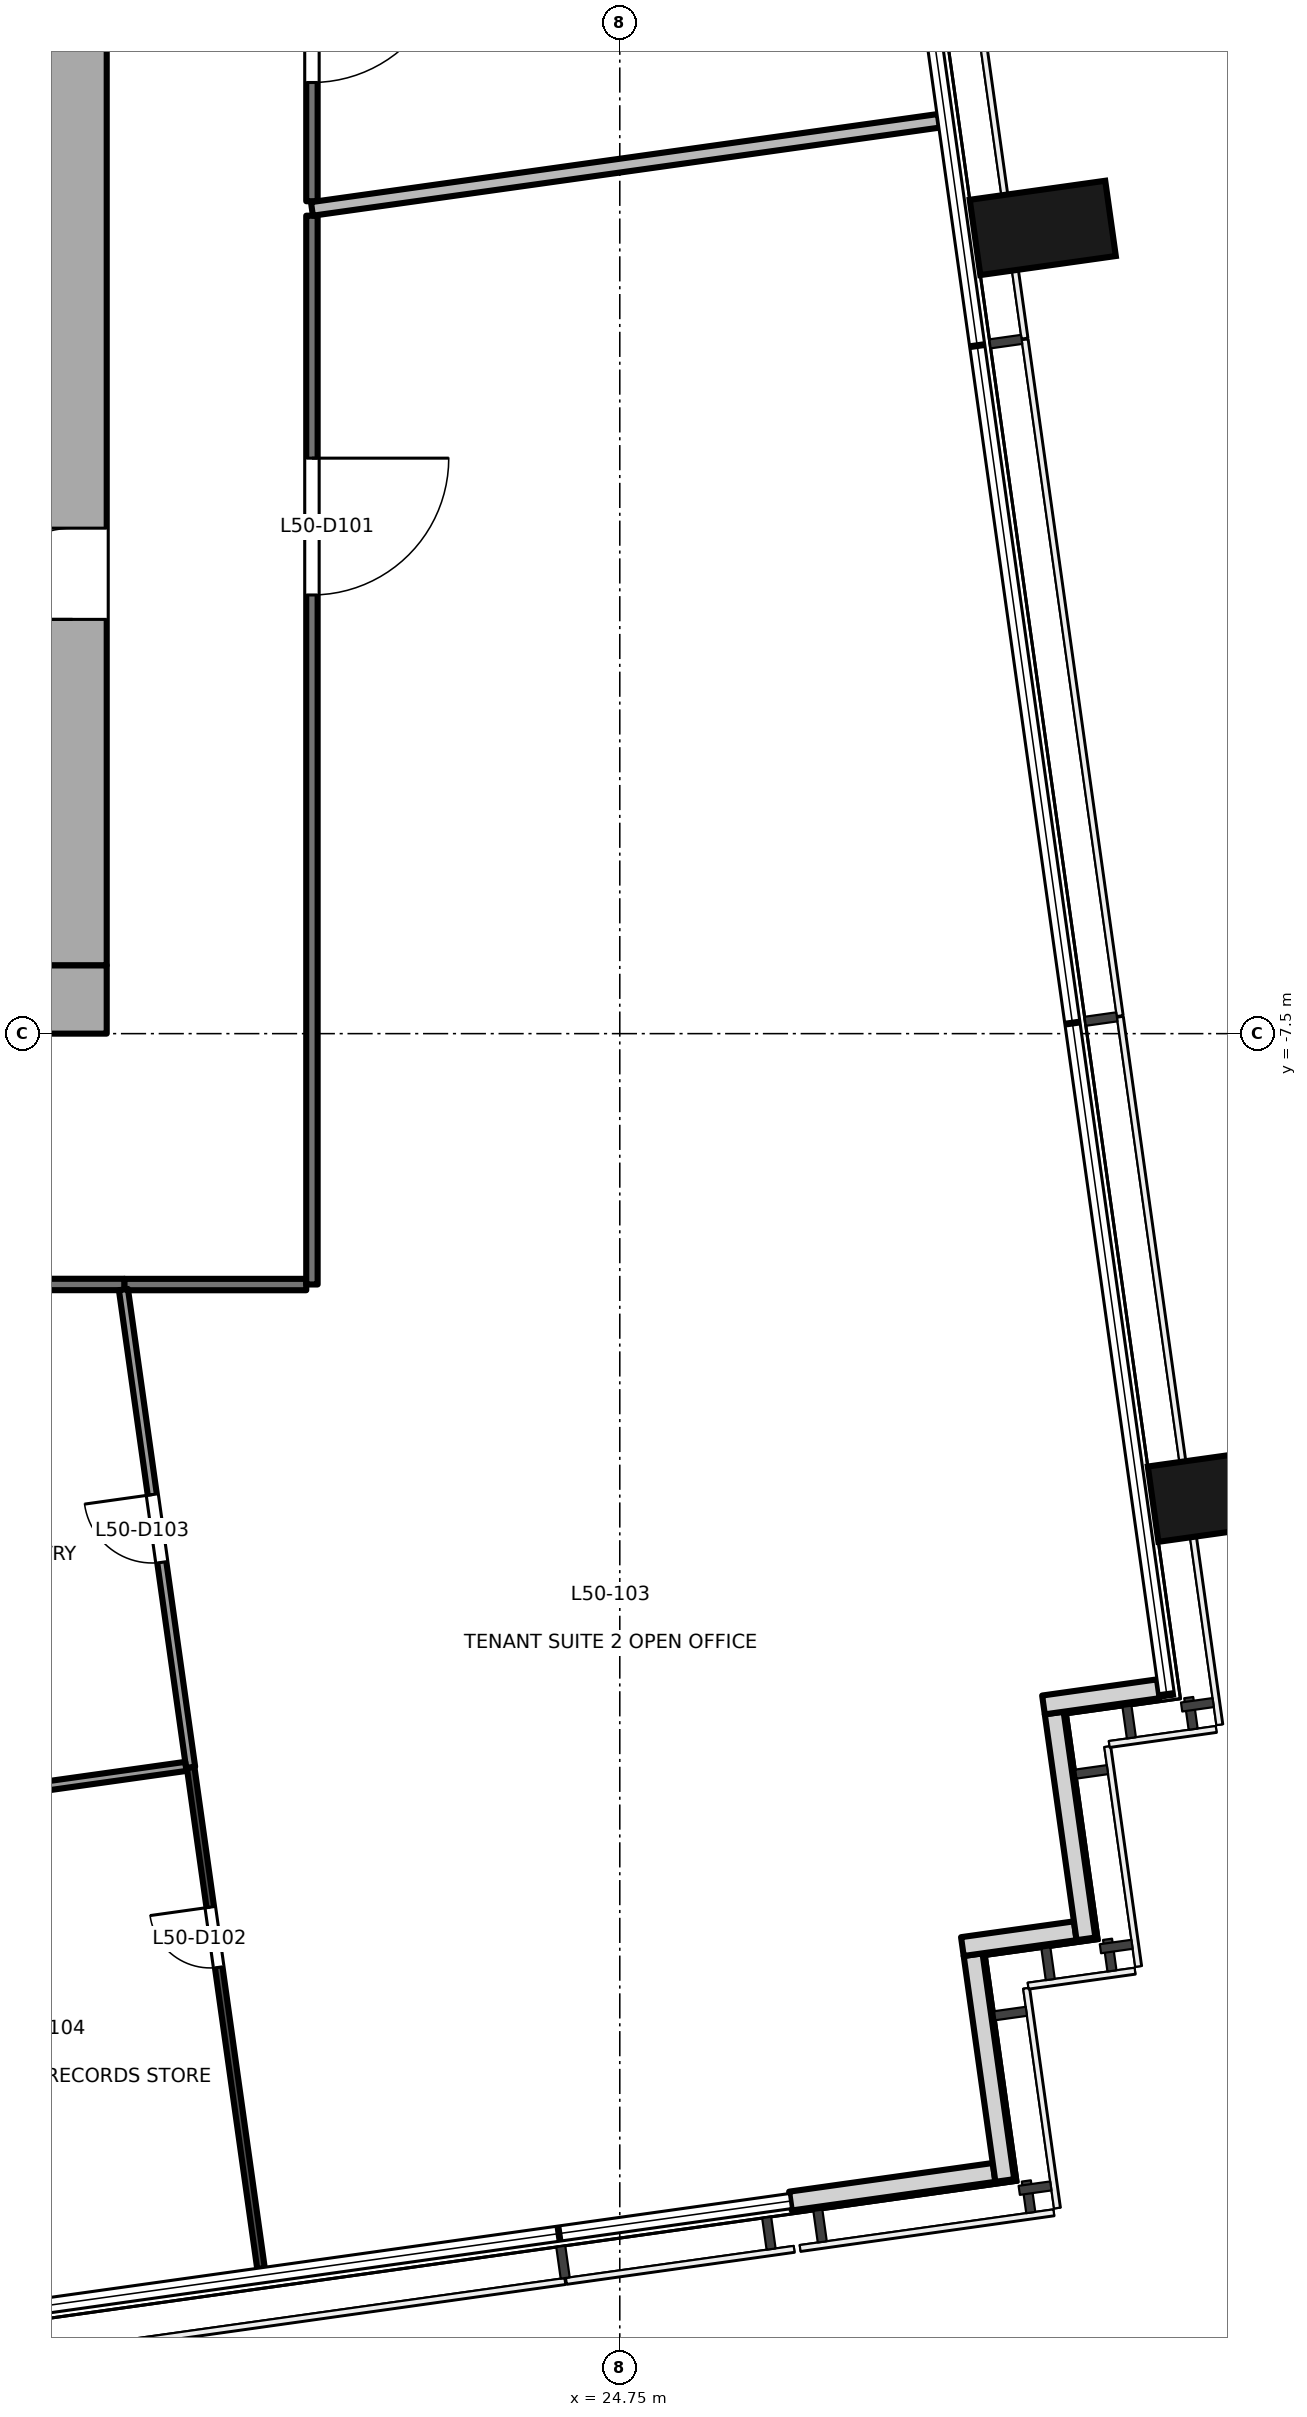
"""IFC4 building model, lengths in metres.
Left out: names, types, materials, properties, quantities, classifications, styles, units other than length and angle.
Written with IfcOpenShell. Run it as: python <this file> out.ifc"""

import sys

from ifc_helpers import new_model, si_unit, direction, frame, frame_2d, origin, origin_2d, place, context, subcontext, project, spatial, rectangle, extrude, element, fill, save


model = new_model("IFC4")
c1 = context("Model", 3, precision=1e-05, world=origin(), true_north=direction((0.0, 1.0)))
c2 = subcontext(c1, "Body", "Model", "MODEL_VIEW")
j1 = project(units=[si_unit("LENGTHUNIT", "METRE"), si_unit("PLANEANGLEUNIT", "RADIAN")], contexts=[c1])
p1 = place(None, origin())
s1 = spatial("IfcSite", under=j1, at=p1, CompositionType="ELEMENT")
p2 = place(p1, origin())
s2 = spatial("IfcBuilding", under=s1, at=p2, CompositionType="ELEMENT")
p3 = place(p2, frame((0.0, 0.0, 221.3)))
s3 = spatial("IfcBuildingStorey", under=s2, at=p3, CompositionType="ELEMENT", Elevation=221.3)
for number, where, z_axis, x_axis in (
    (1, (32.658, -13.565, -0.2), (0.0, 0.0, 1.0), (-0.139, 0.99, 0.0)),
    (2, (30.315, 3.1, -0.2), (0.0, 0.0, 1.0), (-0.139, 0.99, 0.0)),
):
    element("IfcColumn", number, at=place(p3, frame(where, z_axis=z_axis, x_axis=x_axis)), inside=s3, PredefinedType="COLUMN", context=c2, shape_type="SweptSolid", body=[
        extrude(rectangle(XDim=1.0, YDim=1.8, at=origin_2d()), origin(), (0.0, 0.0, 1.0), 3.9),
    ])
p4 = place(p3, frame((26.995, -22.859, 0.0), z_axis=(0.0, 0.0, 1.0), x_axis=(0.99024510326, 0.139336411139, 0.0)))
e3 = element("IfcWall", 3, at=p4, inside=s3, PredefinedType="SOLIDWALL", context=c2, shape_type="SweptSolid", body=[
    extrude(rectangle(XDim=2.705, YDim=0.25, at=frame_2d((1.353, 0.0))), origin(), (0.0, 0.0, 1.0), 3.7),
])
p5 = place(p3, frame((29.815, -22.588, 0.0), z_axis=(0.0, 0.0, 1.0), x_axis=(-0.138983028379, 0.9902947631, 0.0)))
e4 = element("IfcWall", 4, at=p5, inside=s3, PredefinedType="SOLIDWALL", context=c2, shape_type="SweptSolid", body=[
    extrude(rectangle(XDim=3.0, YDim=0.25, at=frame_2d((1.5, 0.0))), origin(), (0.0, 0.0, 1.0), 3.7),
])
p6 = place(p3, frame((29.257, -19.51, 0.0), z_axis=(0.0, 0.0, 1.0), x_axis=(0.990330117064, 0.138730887823, 0.0)))
e5 = element("IfcWall", 5, at=p6, inside=s3, PredefinedType="SOLIDWALL", context=c2, shape_type="SweptSolid", body=[
    extrude(rectangle(XDim=1.499, YDim=0.25, at=frame_2d((0.75, 0.0))), origin(), (0.0, 0.0, 1.0), 3.7),
])
p7 = place(p3, frame((30.883, -19.409, 0.0), z_axis=(0.0, 0.0, 1.0), x_axis=(-0.139324658755, 0.990246756855, 0.0)))
e6 = element("IfcWall", 6, at=p7, inside=s3, PredefinedType="SOLIDWALL", context=c2, shape_type="SweptSolid", body=[
    extrude(rectangle(XDim=3.0, YDim=0.25, at=frame_2d((1.5, 0.0))), origin(), (0.0, 0.0, 1.0), 3.7),
])
p8 = place(p3, frame((30.324, -16.332, 0.0), z_axis=(0.0, 0.0, 1.0), x_axis=(0.990238641016, 0.139382329723, 0.0)))
e7 = element("IfcWall", 7, at=p8, inside=s3, PredefinedType="SOLIDWALL", context=c2, shape_type="SweptSolid", body=[
    extrude(rectangle(XDim=1.526, YDim=0.25, at=frame_2d((0.763, 0.0))), origin(), (0.0, 0.0, 1.0), 3.7),
])
p9 = place(p3, frame((-18.0, -7.05, -0.2), z_axis=(0.0, 0.0, 1.0), x_axis=(1.0, 0.0, 0.0)))
e8 = element("IfcWall", 8, at=p9, inside=s3, PredefinedType="SHEAR", context=c2, shape_type="SweptSolid", body=[
    extrude(rectangle(XDim=36.0, YDim=0.9, at=frame_2d((18.0, 0.0))), origin(), (0.0, 0.0, 1.0), 3.9),
])
p10 = place(p9, frame((4.9, 0.0, 0.2)))
e9 = element("IfcOpeningElement", 9, at=p10, cuts=e8, PredefinedType="OPENING", context=c2, shape_type="SweptSolid", body=[
    extrude(rectangle(XDim=1.8, YDim=2.1, at=frame_2d((0.9, 1.05))), frame((0.0, 0.46, 0.0), z_axis=(0.0, -1.0, 0.0), x_axis=(1.0, 0.0, 0.0)), (0.0, 0.0, 1.0), 0.921),
])
p11 = place(p9, frame((16.8, 0.0, 0.2)))
e10 = element("IfcOpeningElement", 10, at=p11, cuts=e8, PredefinedType="OPENING", context=c2, shape_type="SweptSolid", body=[
    extrude(rectangle(XDim=2.4, YDim=2.1, at=frame_2d((1.2, 1.05))), frame((0.0, 0.46, 0.0), z_axis=(0.0, -1.0, 0.0), x_axis=(1.0, 0.0, 0.0)), (0.0, 0.0, 1.0), 0.921),
])
p12 = place(p9, frame((26.1, 0.0, 0.2)))
e11 = element("IfcOpeningElement", 11, at=p12, cuts=e8, PredefinedType="OPENING", context=c2, shape_type="SweptSolid", body=[
    extrude(rectangle(XDim=2.4, YDim=2.1, at=frame_2d((1.2, 1.05))), frame((0.0, 0.46, 0.0), z_axis=(0.0, -1.0, 0.0), x_axis=(1.0, 0.0, 0.0)), (0.0, 0.0, 1.0), 0.921),
])
p13 = place(p3, frame((17.55, -6.6, -0.2), z_axis=(0.0, 0.0, 1.0), x_axis=(0.0, 1.0, 0.0)))
e12 = element("IfcWall", 12, at=p13, inside=s3, PredefinedType="SHEAR", context=c2, shape_type="SweptSolid", body=[
    extrude(rectangle(XDim=13.2, YDim=0.9, at=frame_2d((6.6, 0.0))), origin(), (0.0, 0.0, 1.0), 3.9),
])
p14 = place(p13, frame((4.55, 0.0, 0.2)))
e13 = element("IfcOpeningElement", 13, at=p14, cuts=e12, PredefinedType="OPENING", context=c2, shape_type="SweptSolid", body=[
    extrude(rectangle(XDim=1.2, YDim=2.1, at=frame_2d((0.6, 1.05))), frame((0.0, 0.46, 0.0), z_axis=(0.0, -1.0, 0.0), x_axis=(1.0, 0.0, 0.0)), (0.0, 0.0, 1.0), 0.921),
])
p15 = place(p3, frame((20.625, -10.801, 0.0), z_axis=(0.0, 0.0, 1.0), x_axis=(-1.0, 0.0, 0.0)))
e14 = element("IfcWall", 14, at=p15, inside=s3, PredefinedType="PARTITIONING", context=c2, shape_type="SweptSolid", body=[
    extrude(rectangle(XDim=2.394, YDim=0.15, at=frame_2d((1.197, 0.0))), origin(), (0.0, 0.0, 1.0), 3.7),
])
p16 = place(p3, frame((20.7, 3.261, 0.0), z_axis=(0.0, 0.0, 1.0), x_axis=(0.0, -1.0, 0.0)))
e15 = element("IfcWall", 15, at=p16, inside=s3, PredefinedType="PARTITIONING", context=c2, shape_type="SweptSolid", body=[
    extrude(rectangle(XDim=14.061, YDim=0.15, at=frame_2d((7.031, 0.0))), origin(), (0.0, 0.0, 1.0), 3.1),
])
p17 = place(p16, frame((3.19, 0.0, 0.0)))
e16 = element("IfcOpeningElement", 16, at=p17, cuts=e15, PredefinedType="OPENING", context=c2, shape_type="SweptSolid", body=[
    extrude(rectangle(XDim=1.8, YDim=2.1, at=frame_2d((0.9, 1.05))), frame((0.0, 0.085, 0.0), z_axis=(0.0, -1.0, 0.0), x_axis=(1.0, 0.0, 0.0)), (0.0, 0.0, 1.0), 0.171),
])
p18 = place(p3, frame((18.231, -10.8, 0.0), z_axis=(0.0, 0.0, 1.0), x_axis=(-1.0, 0.0, 0.0)))
e17 = element("IfcWall", 17, at=p18, inside=s3, PredefinedType="PARTITIONING", context=c2, shape_type="SweptSolid", body=[
    extrude(rectangle(XDim=4.782, YDim=0.15, at=frame_2d((2.391, 0.0))), origin(), (0.0, 0.0, 1.0), 2.9),
])
p19 = place(p3, frame((20.7, 7.5, 0.0), z_axis=(0.0, 0.0, 1.0), x_axis=(0.0, -1.0, 0.0)))
e18 = element("IfcWall", 18, at=p19, inside=s3, PredefinedType="PARTITIONING", context=c2, shape_type="SweptSolid", body=[
    extrude(rectangle(XDim=4.049, YDim=0.15, at=frame_2d((2.024, 0.0))), origin(), (0.0, 0.0, 1.0), 3.15),
])
p20 = place(p19, frame((0.687, 0.0, 0.0)))
e19 = element("IfcOpeningElement", 19, at=p20, cuts=e18, PredefinedType="OPENING", context=c2, shape_type="SweptSolid", body=[
    extrude(rectangle(XDim=1.8, YDim=2.1, at=frame_2d((0.9, 1.05))), frame((0.0, 0.085, 0.0), z_axis=(0.0, -1.0, 0.0), x_axis=(1.0, 0.0, 0.0)), (0.0, 0.0, 1.0), 0.171),
])
p21 = place(p3, frame((20.03, -23.746, 0.0), z_axis=(0.0, 0.0, 1.0), x_axis=(-0.139070003418, 0.990282552683, 0.0)))
e20 = element("IfcWall", 20, at=p21, inside=s3, PredefinedType="PARTITIONING", context=c2, shape_type="SweptSolid", body=[
    extrude(rectangle(XDim=6.659, YDim=0.1, at=frame_2d((3.329, 0.0))), origin(), (0.0, 0.0, 1.0), 3.7),
])
p22 = place(p21, frame((4.001, 0.0, 0.0)))
e21 = element("IfcOpeningElement", 21, at=p22, cuts=e20, PredefinedType="OPENING", context=c2, shape_type="SweptSolid", body=[
    extrude(rectangle(XDim=0.8, YDim=2.1, at=frame_2d((0.4, 1.05))), frame((0.0, 0.061, 0.0), z_axis=(0.0, -1.0, 0.0), x_axis=(1.0, 0.0, 0.0)), (0.0, 0.0, 1.0), 0.121),
])
p23 = place(p3, frame((19.104, -17.152, 0.0), z_axis=(0.0, 0.0, 1.0), x_axis=(-0.139283120935, 0.99025260021, 0.0)))
e22 = element("IfcWall", 22, at=p23, inside=s3, PredefinedType="PARTITIONING", context=c2, shape_type="SweptSolid", body=[
    extrude(rectangle(XDim=6.347, YDim=0.12, at=frame_2d((3.173, 0.0))), origin(), (0.0, 0.0, 1.0), 3.7),
])
p24 = place(p23, frame((2.723, 0.0, 0.0)))
e23 = element("IfcOpeningElement", 23, at=p24, cuts=e22, PredefinedType="OPENING", context=c2, shape_type="SweptSolid", body=[
    extrude(rectangle(XDim=0.9, YDim=2.1, at=frame_2d((0.45, 1.05))), frame((0.0, 0.071, 0.0), z_axis=(0.0, -1.0, 0.0), x_axis=(1.0, 0.0, 0.0)), (0.0, 0.0, 1.0), 0.141),
])
p25 = place(p3, frame((20.7, 3.35, 0.0), z_axis=(0.0, 0.0, 1.0), x_axis=(0.990269965101, 0.139159606996, 0.0)))
e24 = element("IfcWall", 24, at=p25, inside=s3, PredefinedType="PARTITIONING", context=c2, shape_type="SweptSolid", body=[
    extrude(rectangle(XDim=8.328, YDim=0.18, at=frame_2d((4.164, 0.0))), origin(), (0.0, 0.0, 1.0), 3.15),
])
p26 = place(p3, frame((14.421, -17.79, 0.0), z_axis=(0.0, 0.0, 1.0), x_axis=(0.990243495755, 0.139347834982, 0.0)))
e25 = element("IfcWall", 25, at=p26, inside=s3, PredefinedType="PARTITIONING", context=c2, shape_type="SweptSolid", body=[
    extrude(rectangle(XDim=4.666, YDim=0.12, at=frame_2d((2.333, 0.0))), origin(), (0.0, 0.0, 1.0), 3.7),
])
p27 = place(p14, origin())
e26 = element("IfcDoor", 26, at=p27, inside=s3, OperationType="SINGLE_SWING_LEFT", PredefinedType="DOOR", context=c2, shape_type="SweptSolid", body=[
    extrude(rectangle(XDim=1.2, YDim=2.1, at=frame_2d((0.6, 1.05))), frame((0.0, 0.025, 0.0), z_axis=(0.0, -1.0, 0.0), x_axis=(1.0, 0.0, 0.0)), (0.0, 0.0, 1.0), 0.05),
])
fill(e13, e26)
p28 = place(p17, origin())
e27 = element("IfcDoor", 27, at=p28, inside=s3, OperationType="DOUBLE_DOOR_SINGLE_SWING", PredefinedType="DOOR", context=c2, shape_type="SweptSolid", body=[
    extrude(rectangle(XDim=1.8, YDim=2.1, at=frame_2d((0.9, 1.05))), frame((0.0, 0.025, 0.0), z_axis=(0.0, -1.0, 0.0), x_axis=(1.0, 0.0, 0.0)), (0.0, 0.0, 1.0), 0.05),
])
fill(e16, e27)
p29 = place(p22, origin())
e28 = element("IfcDoor", 28, at=p29, inside=s3, OperationType="SINGLE_SWING_RIGHT", PredefinedType="DOOR", context=c2, shape_type="SweptSolid", body=[
    extrude(rectangle(XDim=0.8, YDim=2.1, at=frame_2d((0.4, 1.05))), frame((0.0, 0.025, 0.0), z_axis=(0.0, -1.0, 0.0), x_axis=(1.0, 0.0, 0.0)), (0.0, 0.0, 1.0), 0.05),
])
fill(e21, e28)
p30 = place(p24, origin())
e29 = element("IfcDoor", 29, at=p30, inside=s3, OperationType="SINGLE_SWING_RIGHT", PredefinedType="DOOR", context=c2, shape_type="SweptSolid", body=[
    extrude(rectangle(XDim=0.9, YDim=2.1, at=frame_2d((0.45, 1.05))), frame((0.0, 0.025, 0.0), z_axis=(0.0, -1.0, 0.0), x_axis=(1.0, 0.0, 0.0)), (0.0, 0.0, 1.0), 0.05),
])
fill(e23, e29)
p31 = place(p20, origin())
e30 = element("IfcDoor", 30, at=p31, inside=s3, OperationType="DOUBLE_DOOR_SINGLE_SWING", PredefinedType="DOOR", context=c2, shape_type="SweptSolid", body=[
    extrude(rectangle(XDim=1.8, YDim=2.1, at=frame_2d((0.9, 1.05))), frame((0.0, 0.025, 0.0), z_axis=(0.0, -1.0, 0.0), x_axis=(1.0, 0.0, 0.0)), (0.0, 0.0, 1.0), 0.05),
])
fill(e19, e30)
save(model, sys.argv[1])
